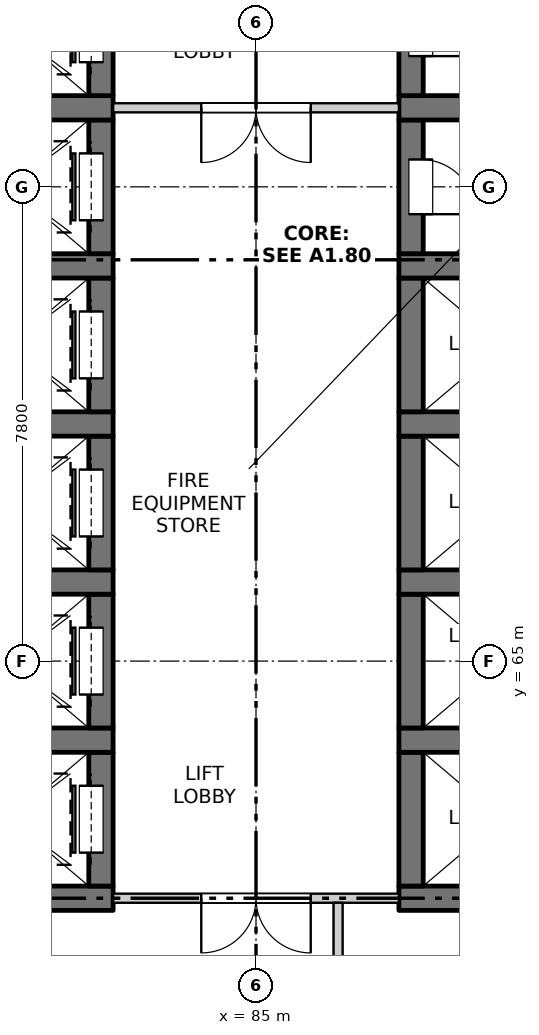
"""IFC4 building model, lengths in metres.
Left out: names, types, materials, properties, quantities, classifications, styles, units other than length and angle.
Written with IfcOpenShell. Run it as: python <this file> out.ifc"""

import sys

from ifc_helpers import new_model, si_unit, direction, frame, frame_2d, origin, place, context, subcontext, project, spatial, rectangle, extrude, element, fill, save


model = new_model("IFC4")
c1 = context("Model", 3, precision=1e-05, world=origin(), true_north=direction((0.0, 1.0)))
c2 = subcontext(c1, "Body", "Model", "MODEL_VIEW")
j1 = project(units=[si_unit("LENGTHUNIT", "METRE"), si_unit("PLANEANGLEUNIT", "RADIAN")], contexts=[c1])
p1 = place(None, origin())
s1 = spatial("IfcSite", under=j1, at=p1, CompositionType="ELEMENT")
p2 = place(p1, origin())
s2 = spatial("IfcBuilding", under=s1, at=p2, CompositionType="ELEMENT")
p3 = place(p2, frame((0.0, 0.0, 71.6)))
s3 = spatial("IfcBuildingStorey", under=s2, at=p3, CompositionType="ELEMENT", Elevation=71.6)
p4 = place(p3, frame((79.65, 61.1, -0.25), z_axis=(0.0, 0.0, 1.0), x_axis=(1.0, 0.0, 0.0)))
e1 = element("IfcWall", 1, at=p4, inside=s3, PredefinedType="SOLIDWALL", context=c2, shape_type="SweptSolid", body=[
    extrude(rectangle(XDim=3.0, YDim=0.4, at=frame_2d((1.5, 0.0))), origin(), (0.0, 0.0, 1.0), 3.4),
])
p5 = place(p3, frame((82.45, 61.3, -0.25), z_axis=(0.0, 0.0, 1.0), x_axis=(0.0, 1.0, 0.0)))
e2 = element("IfcWall", 2, at=p5, inside=s3, PredefinedType="SOLIDWALL", context=c2, shape_type="SweptSolid", body=[
    extrude(rectangle(XDim=2.2, YDim=0.4, at=frame_2d((1.1, 0.0))), origin(), (0.0, 0.0, 1.0), 3.4),
])
p6 = place(p5, frame((0.55, 0.0, 0.25)))
e3 = element("IfcOpeningElement", 3, at=p6, cuts=e2, PredefinedType="OPENING", context=c2, shape_type="SweptSolid", body=[
    extrude(rectangle(XDim=1.1, YDim=2.1, at=frame_2d((0.55, 1.05))), frame((0.0, 0.21, 0.0), z_axis=(0.0, -1.0, 0.0), x_axis=(1.0, 0.0, 0.0)), (0.0, 0.0, 1.0), 0.42),
])
p7 = place(p3, frame((79.65, 63.7, -0.25), z_axis=(0.0, 0.0, 1.0), x_axis=(1.0, 0.0, 0.0)))
e4 = element("IfcWall", 4, at=p7, inside=s3, PredefinedType="SOLIDWALL", context=c2, shape_type="SweptSolid", body=[
    extrude(rectangle(XDim=3.0, YDim=0.4, at=frame_2d((1.5, 0.0))), origin(), (0.0, 0.0, 1.0), 3.4),
])
p8 = place(p3, frame((82.45, 63.9, -0.25), z_axis=(0.0, 0.0, 1.0), x_axis=(0.0, 1.0, 0.0)))
e5 = element("IfcWall", 5, at=p8, inside=s3, PredefinedType="SOLIDWALL", context=c2, shape_type="SweptSolid", body=[
    extrude(rectangle(XDim=2.2, YDim=0.4, at=frame_2d((1.1, 0.0))), origin(), (0.0, 0.0, 1.0), 3.4),
])
p9 = place(p8, frame((0.55, 0.0, 0.25)))
e6 = element("IfcOpeningElement", 6, at=p9, cuts=e5, PredefinedType="OPENING", context=c2, shape_type="SweptSolid", body=[
    extrude(rectangle(XDim=1.1, YDim=2.1, at=frame_2d((0.55, 1.05))), frame((0.0, 0.21, 0.0), z_axis=(0.0, -1.0, 0.0), x_axis=(1.0, 0.0, 0.0)), (0.0, 0.0, 1.0), 0.42),
])
p10 = place(p3, frame((79.65, 66.3, -0.25), z_axis=(0.0, 0.0, 1.0), x_axis=(1.0, 0.0, 0.0)))
e7 = element("IfcWall", 7, at=p10, inside=s3, PredefinedType="SOLIDWALL", context=c2, shape_type="SweptSolid", body=[
    extrude(rectangle(XDim=3.0, YDim=0.4, at=frame_2d((1.5, 0.0))), origin(), (0.0, 0.0, 1.0), 3.4),
])
p11 = place(p3, frame((82.45, 66.5, -0.25), z_axis=(0.0, 0.0, 1.0), x_axis=(0.0, 1.0, 0.0)))
e8 = element("IfcWall", 8, at=p11, inside=s3, PredefinedType="SOLIDWALL", context=c2, shape_type="SweptSolid", body=[
    extrude(rectangle(XDim=2.2, YDim=0.4, at=frame_2d((1.1, 0.0))), origin(), (0.0, 0.0, 1.0), 3.4),
])
p12 = place(p11, frame((0.55, 0.0, 0.25)))
e9 = element("IfcOpeningElement", 9, at=p12, cuts=e8, PredefinedType="OPENING", context=c2, shape_type="SweptSolid", body=[
    extrude(rectangle(XDim=1.1, YDim=2.1, at=frame_2d((0.55, 1.05))), frame((0.0, 0.21, 0.0), z_axis=(0.0, -1.0, 0.0), x_axis=(1.0, 0.0, 0.0)), (0.0, 0.0, 1.0), 0.42),
])
p13 = place(p3, frame((79.65, 68.9, -0.25), z_axis=(0.0, 0.0, 1.0), x_axis=(1.0, 0.0, 0.0)))
e10 = element("IfcWall", 10, at=p13, inside=s3, PredefinedType="SOLIDWALL", context=c2, shape_type="SweptSolid", body=[
    extrude(rectangle(XDim=3.0, YDim=0.4, at=frame_2d((1.5, 0.0))), origin(), (0.0, 0.0, 1.0), 3.4),
])
p14 = place(p3, frame((82.45, 69.1, -0.25), z_axis=(0.0, 0.0, 1.0), x_axis=(0.0, 1.0, 0.0)))
e11 = element("IfcWall", 11, at=p14, inside=s3, PredefinedType="SOLIDWALL", context=c2, shape_type="SweptSolid", body=[
    extrude(rectangle(XDim=2.2, YDim=0.4, at=frame_2d((1.1, 0.0))), origin(), (0.0, 0.0, 1.0), 3.4),
])
p15 = place(p14, frame((0.55, 0.0, 0.25)))
e12 = element("IfcOpeningElement", 12, at=p15, cuts=e11, PredefinedType="OPENING", context=c2, shape_type="SweptSolid", body=[
    extrude(rectangle(XDim=1.1, YDim=2.1, at=frame_2d((0.55, 1.05))), frame((0.0, 0.21, 0.0), z_axis=(0.0, -1.0, 0.0), x_axis=(1.0, 0.0, 0.0)), (0.0, 0.0, 1.0), 0.42),
])
p16 = place(p3, frame((79.65, 71.5, -0.25), z_axis=(0.0, 0.0, 1.0), x_axis=(1.0, 0.0, 0.0)))
e13 = element("IfcWall", 13, at=p16, inside=s3, PredefinedType="SOLIDWALL", context=c2, shape_type="SweptSolid", body=[
    extrude(rectangle(XDim=3.0, YDim=0.4, at=frame_2d((1.5, 0.0))), origin(), (0.0, 0.0, 1.0), 3.4),
])
p17 = place(p3, frame((82.45, 71.7, -0.25), z_axis=(0.0, 0.0, 1.0), x_axis=(0.0, 1.0, 0.0)))
e14 = element("IfcWall", 14, at=p17, inside=s3, PredefinedType="SOLIDWALL", context=c2, shape_type="SweptSolid", body=[
    extrude(rectangle(XDim=2.2, YDim=0.4, at=frame_2d((1.1, 0.0))), origin(), (0.0, 0.0, 1.0), 3.4),
])
p18 = place(p17, frame((0.55, 0.0, 0.25)))
e15 = element("IfcOpeningElement", 15, at=p18, cuts=e14, PredefinedType="OPENING", context=c2, shape_type="SweptSolid", body=[
    extrude(rectangle(XDim=1.1, YDim=2.1, at=frame_2d((0.55, 1.05))), frame((0.0, 0.21, 0.0), z_axis=(0.0, -1.0, 0.0), x_axis=(1.0, 0.0, 0.0)), (0.0, 0.0, 1.0), 0.42),
])
p19 = place(p3, frame((79.65, 74.1, -0.25), z_axis=(0.0, 0.0, 1.0), x_axis=(1.0, 0.0, 0.0)))
e16 = element("IfcWall", 16, at=p19, inside=s3, PredefinedType="SOLIDWALL", context=c2, shape_type="SweptSolid", body=[
    extrude(rectangle(XDim=3.0, YDim=0.4, at=frame_2d((1.5, 0.0))), origin(), (0.0, 0.0, 1.0), 3.4),
])
p20 = place(p3, frame((82.45, 74.3, -0.25), z_axis=(0.0, 0.0, 1.0), x_axis=(0.0, 1.0, 0.0)))
e17 = element("IfcWall", 17, at=p20, inside=s3, PredefinedType="SOLIDWALL", context=c2, shape_type="SweptSolid", body=[
    extrude(rectangle(XDim=2.2, YDim=0.4, at=frame_2d((1.1, 0.0))), origin(), (0.0, 0.0, 1.0), 3.4),
])
p21 = place(p20, frame((0.55, 0.0, 0.25)))
e18 = element("IfcOpeningElement", 18, at=p21, cuts=e17, PredefinedType="OPENING", context=c2, shape_type="SweptSolid", body=[
    extrude(rectangle(XDim=1.1, YDim=2.1, at=frame_2d((0.55, 1.05))), frame((0.0, 0.21, 0.0), z_axis=(0.0, -1.0, 0.0), x_axis=(1.0, 0.0, 0.0)), (0.0, 0.0, 1.0), 0.42),
])
p22 = place(p3, frame((87.35, 61.1, -0.25), z_axis=(0.0, 0.0, 1.0), x_axis=(1.0, 0.0, 0.0)))
e19 = element("IfcWall", 19, at=p22, inside=s3, PredefinedType="SOLIDWALL", context=c2, shape_type="SweptSolid", body=[
    extrude(rectangle(XDim=3.0, YDim=0.4, at=frame_2d((1.5, 0.0))), origin(), (0.0, 0.0, 1.0), 3.4),
])
p23 = place(p3, frame((87.55, 61.3, -0.25), z_axis=(0.0, 0.0, 1.0), x_axis=(0.0, 1.0, 0.0)))
e20 = element("IfcWall", 20, at=p23, inside=s3, PredefinedType="SOLIDWALL", context=c2, shape_type="SweptSolid", body=[
    extrude(rectangle(XDim=2.2, YDim=0.4, at=frame_2d((1.1, 0.0))), origin(), (0.0, 0.0, 1.0), 3.4),
])
p24 = place(p3, frame((87.35, 63.7, -0.25), z_axis=(0.0, 0.0, 1.0), x_axis=(1.0, 0.0, 0.0)))
e21 = element("IfcWall", 21, at=p24, inside=s3, PredefinedType="SOLIDWALL", context=c2, shape_type="SweptSolid", body=[
    extrude(rectangle(XDim=3.0, YDim=0.4, at=frame_2d((1.5, 0.0))), origin(), (0.0, 0.0, 1.0), 3.4),
])
p25 = place(p3, frame((87.55, 63.9, -0.25), z_axis=(0.0, 0.0, 1.0), x_axis=(0.0, 1.0, 0.0)))
e22 = element("IfcWall", 22, at=p25, inside=s3, PredefinedType="SOLIDWALL", context=c2, shape_type="SweptSolid", body=[
    extrude(rectangle(XDim=2.2, YDim=0.4, at=frame_2d((1.1, 0.0))), origin(), (0.0, 0.0, 1.0), 3.4),
])
p26 = place(p3, frame((87.35, 66.3, -0.25), z_axis=(0.0, 0.0, 1.0), x_axis=(1.0, 0.0, 0.0)))
e23 = element("IfcWall", 23, at=p26, inside=s3, PredefinedType="SOLIDWALL", context=c2, shape_type="SweptSolid", body=[
    extrude(rectangle(XDim=3.0, YDim=0.4, at=frame_2d((1.5, 0.0))), origin(), (0.0, 0.0, 1.0), 3.4),
])
p27 = place(p3, frame((87.55, 66.5, -0.25), z_axis=(0.0, 0.0, 1.0), x_axis=(0.0, 1.0, 0.0)))
e24 = element("IfcWall", 24, at=p27, inside=s3, PredefinedType="SOLIDWALL", context=c2, shape_type="SweptSolid", body=[
    extrude(rectangle(XDim=2.2, YDim=0.4, at=frame_2d((1.1, 0.0))), origin(), (0.0, 0.0, 1.0), 3.4),
])
p28 = place(p3, frame((87.35, 68.9, -0.25), z_axis=(0.0, 0.0, 1.0), x_axis=(1.0, 0.0, 0.0)))
e25 = element("IfcWall", 25, at=p28, inside=s3, PredefinedType="SOLIDWALL", context=c2, shape_type="SweptSolid", body=[
    extrude(rectangle(XDim=3.0, YDim=0.4, at=frame_2d((1.5, 0.0))), origin(), (0.0, 0.0, 1.0), 3.4),
])
p29 = place(p3, frame((87.55, 69.1, -0.25), z_axis=(0.0, 0.0, 1.0), x_axis=(0.0, 1.0, 0.0)))
e26 = element("IfcWall", 26, at=p29, inside=s3, PredefinedType="SOLIDWALL", context=c2, shape_type="SweptSolid", body=[
    extrude(rectangle(XDim=2.2, YDim=0.4, at=frame_2d((1.1, 0.0))), origin(), (0.0, 0.0, 1.0), 3.4),
])
p30 = place(p3, frame((87.35, 71.5, -0.25), z_axis=(0.0, 0.0, 1.0), x_axis=(1.0, 0.0, 0.0)))
e27 = element("IfcWall", 27, at=p30, inside=s3, PredefinedType="SOLIDWALL", context=c2, shape_type="SweptSolid", body=[
    extrude(rectangle(XDim=3.0, YDim=0.4, at=frame_2d((1.5, 0.0))), origin(), (0.0, 0.0, 1.0), 3.4),
])
p31 = place(p3, frame((87.55, 71.7, -0.25), z_axis=(0.0, 0.0, 1.0), x_axis=(0.0, 1.0, 0.0)))
e28 = element("IfcWall", 28, at=p31, inside=s3, PredefinedType="SOLIDWALL", context=c2, shape_type="SweptSolid", body=[
    extrude(rectangle(XDim=2.2, YDim=0.4, at=frame_2d((1.1, 0.0))), origin(), (0.0, 0.0, 1.0), 3.4),
])
p32 = place(p31, frame((0.65, 0.0, 0.25)))
e29 = element("IfcOpeningElement", 29, at=p32, cuts=e28, PredefinedType="OPENING", context=c2, shape_type="SweptSolid", body=[
    extrude(rectangle(XDim=0.9, YDim=2.1, at=frame_2d((0.45, 1.05))), frame((0.0, 0.21, 0.0), z_axis=(0.0, -1.0, 0.0), x_axis=(1.0, 0.0, 0.0)), (0.0, 0.0, 1.0), 0.42),
])
p33 = place(p3, frame((87.35, 74.1, -0.25), z_axis=(0.0, 0.0, 1.0), x_axis=(1.0, 0.0, 0.0)))
e30 = element("IfcWall", 30, at=p33, inside=s3, PredefinedType="SOLIDWALL", context=c2, shape_type="SweptSolid", body=[
    extrude(rectangle(XDim=3.0, YDim=0.4, at=frame_2d((1.5, 0.0))), origin(), (0.0, 0.0, 1.0), 3.4),
])
p34 = place(p3, frame((87.55, 74.3, -0.25), z_axis=(0.0, 0.0, 1.0), x_axis=(0.0, 1.0, 0.0)))
e31 = element("IfcWall", 31, at=p34, inside=s3, PredefinedType="SOLIDWALL", context=c2, shape_type="SweptSolid", body=[
    extrude(rectangle(XDim=2.2, YDim=0.4, at=frame_2d((1.1, 0.0))), origin(), (0.0, 0.0, 1.0), 3.4),
])
p35 = place(p34, frame((0.65, 0.0, 0.25)))
e32 = element("IfcOpeningElement", 32, at=p35, cuts=e31, PredefinedType="OPENING", context=c2, shape_type="SweptSolid", body=[
    extrude(rectangle(XDim=0.9, YDim=2.1, at=frame_2d((0.45, 1.05))), frame((0.0, 0.21, 0.0), z_axis=(0.0, -1.0, 0.0), x_axis=(1.0, 0.0, 0.0)), (0.0, 0.0, 1.0), 0.42),
])
p36 = place(p3, frame((82.65, 61.1, 0.0), z_axis=(0.0, 0.0, 1.0), x_axis=(1.0, 0.0, 0.0)))
e33 = element("IfcWall", 33, at=p36, inside=s3, PredefinedType="PARTITIONING", context=c2, shape_type="SweptSolid", body=[
    extrude(rectangle(XDim=4.7, YDim=0.15, at=frame_2d((2.35, 0.0))), origin(), (0.0, 0.0, 1.0), 3.15),
])
p37 = place(p36, frame((1.45, 0.0, 0.0)))
e34 = element("IfcOpeningElement", 34, at=p37, cuts=e33, PredefinedType="OPENING", context=c2, shape_type="SweptSolid", body=[
    extrude(rectangle(XDim=1.8, YDim=2.1, at=frame_2d((0.9, 1.05))), frame((0.0, 0.085, 0.0), z_axis=(0.0, -1.0, 0.0), x_axis=(1.0, 0.0, 0.0)), (0.0, 0.0, 1.0), 0.17),
])
p38 = place(p3, frame((82.65, 74.1, 0.0), z_axis=(0.0, 0.0, 1.0), x_axis=(1.0, 0.0, 0.0)))
e35 = element("IfcWall", 35, at=p38, inside=s3, PredefinedType="PARTITIONING", context=c2, shape_type="SweptSolid", body=[
    extrude(rectangle(XDim=4.7, YDim=0.15, at=frame_2d((2.35, 0.0))), origin(), (0.0, 0.0, 1.0), 3.15),
])
p39 = place(p38, frame((1.45, 0.0, 0.0)))
e36 = element("IfcOpeningElement", 36, at=p39, cuts=e35, PredefinedType="OPENING", context=c2, shape_type="SweptSolid", body=[
    extrude(rectangle(XDim=1.8, YDim=2.1, at=frame_2d((0.9, 1.05))), frame((0.0, 0.085, 0.0), z_axis=(0.0, -1.0, 0.0), x_axis=(1.0, 0.0, 0.0)), (0.0, 0.0, 1.0), 0.17),
])
p40 = place(p3, frame((86.35, 55.6, 0.0), z_axis=(0.0, 0.0, 1.0), x_axis=(0.0, 1.0, 0.0)))
e37 = element("IfcWall", 37, at=p40, inside=s3, PredefinedType="PARTITIONING", context=c2, shape_type="SweptSolid", body=[
    extrude(rectangle(XDim=5.425, YDim=0.15, at=frame_2d((2.712, 0.0))), origin(), (0.0, 0.0, 1.0), 3.15),
])
p41 = place(p40, frame((2.1, 0.0, 0.0)))
e38 = element("IfcOpeningElement", 38, at=p41, cuts=e37, PredefinedType="OPENING", context=c2, shape_type="SweptSolid", body=[
    extrude(rectangle(XDim=0.9, YDim=2.1, at=frame_2d((0.45, 1.05))), frame((0.0, 0.085, 0.0), z_axis=(0.0, -1.0, 0.0), x_axis=(1.0, 0.0, 0.0)), (0.0, 0.0, 1.0), 0.17),
])
p42 = place(p37, origin())
e39 = element("IfcDoor", 39, at=p42, inside=s3, OperationType="DOUBLE_DOOR_SINGLE_SWING", PredefinedType="DOOR", context=c2, shape_type="SweptSolid", body=[
    extrude(rectangle(XDim=1.8, YDim=2.1, at=frame_2d((0.9, 1.05))), frame((0.0, 0.025, 0.0), z_axis=(0.0, -1.0, 0.0), x_axis=(1.0, 0.0, 0.0)), (0.0, 0.0, 1.0), 0.05),
])
fill(e34, e39)
p43 = place(p6, origin())
e40 = element("IfcDoor", 40, at=p43, inside=s3, OperationType="SLIDING_TO_RIGHT", PredefinedType="DOOR", context=c2, shape_type="SweptSolid", body=[
    extrude(rectangle(XDim=1.1, YDim=2.1, at=frame_2d((0.55, 1.05))), frame((0.0, 0.185, 0.0), z_axis=(0.0, -1.0, 0.0), x_axis=(1.0, 0.0, 0.0)), (0.0, 0.0, 1.0), 0.05),
])
fill(e3, e40)
p44 = place(p9, origin())
e41 = element("IfcDoor", 41, at=p44, inside=s3, OperationType="SLIDING_TO_RIGHT", PredefinedType="DOOR", context=c2, shape_type="SweptSolid", body=[
    extrude(rectangle(XDim=1.1, YDim=2.1, at=frame_2d((0.55, 1.05))), frame((0.0, 0.185, 0.0), z_axis=(0.0, -1.0, 0.0), x_axis=(1.0, 0.0, 0.0)), (0.0, 0.0, 1.0), 0.05),
])
fill(e6, e41)
p45 = place(p12, origin())
e42 = element("IfcDoor", 42, at=p45, inside=s3, OperationType="SLIDING_TO_RIGHT", PredefinedType="DOOR", context=c2, shape_type="SweptSolid", body=[
    extrude(rectangle(XDim=1.1, YDim=2.1, at=frame_2d((0.55, 1.05))), frame((0.0, 0.185, 0.0), z_axis=(0.0, -1.0, 0.0), x_axis=(1.0, 0.0, 0.0)), (0.0, 0.0, 1.0), 0.05),
])
fill(e9, e42)
p46 = place(p15, origin())
e43 = element("IfcDoor", 43, at=p46, inside=s3, OperationType="SLIDING_TO_LEFT", PredefinedType="DOOR", context=c2, shape_type="SweptSolid", body=[
    extrude(rectangle(XDim=1.1, YDim=2.1, at=frame_2d((0.55, 1.05))), frame((0.0, 0.185, 0.0), z_axis=(0.0, -1.0, 0.0), x_axis=(1.0, 0.0, 0.0)), (0.0, 0.0, 1.0), 0.05),
])
fill(e12, e43)
p47 = place(p18, origin())
e44 = element("IfcDoor", 44, at=p47, inside=s3, OperationType="SLIDING_TO_LEFT", PredefinedType="DOOR", context=c2, shape_type="SweptSolid", body=[
    extrude(rectangle(XDim=1.1, YDim=2.1, at=frame_2d((0.55, 1.05))), frame((0.0, 0.185, 0.0), z_axis=(0.0, -1.0, 0.0), x_axis=(1.0, 0.0, 0.0)), (0.0, 0.0, 1.0), 0.05),
])
fill(e15, e44)
p48 = place(p32, origin())
e45 = element("IfcDoor", 45, at=p48, inside=s3, OperationType="SINGLE_SWING_RIGHT", PredefinedType="DOOR", context=c2, shape_type="SweptSolid", body=[
    extrude(rectangle(XDim=0.9, YDim=2.1, at=frame_2d((0.45, 1.05))), frame((0.0, -0.135, 0.0), z_axis=(0.0, -1.0, 0.0), x_axis=(1.0, 0.0, 0.0)), (0.0, 0.0, 1.0), 0.05),
])
fill(e29, e45)
p49 = place(p39, origin())
e46 = element("IfcDoor", 46, at=p49, inside=s3, OperationType="DOUBLE_DOOR_SINGLE_SWING", PredefinedType="DOOR", context=c2, shape_type="SweptSolid", body=[
    extrude(rectangle(XDim=1.8, YDim=2.1, at=frame_2d((0.9, 1.05))), frame((0.0, 0.025, 0.0), z_axis=(0.0, -1.0, 0.0), x_axis=(1.0, 0.0, 0.0)), (0.0, 0.0, 1.0), 0.05),
])
fill(e36, e46)
p50 = place(p21, origin())
e47 = element("IfcDoor", 47, at=p50, inside=s3, OperationType="SLIDING_TO_LEFT", PredefinedType="DOOR", context=c2, shape_type="SweptSolid", body=[
    extrude(rectangle(XDim=1.1, YDim=2.1, at=frame_2d((0.55, 1.05))), frame((0.0, 0.185, 0.0), z_axis=(0.0, -1.0, 0.0), x_axis=(1.0, 0.0, 0.0)), (0.0, 0.0, 1.0), 0.05),
])
fill(e18, e47)
p51 = place(p35, origin())
e48 = element("IfcDoor", 48, at=p51, inside=s3, OperationType="SINGLE_SWING_RIGHT", PredefinedType="DOOR", context=c2, shape_type="SweptSolid", body=[
    extrude(rectangle(XDim=0.9, YDim=2.1, at=frame_2d((0.45, 1.05))), frame((0.0, -0.135, 0.0), z_axis=(0.0, -1.0, 0.0), x_axis=(1.0, 0.0, 0.0)), (0.0, 0.0, 1.0), 0.05),
])
fill(e32, e48)
save(model, sys.argv[1])
